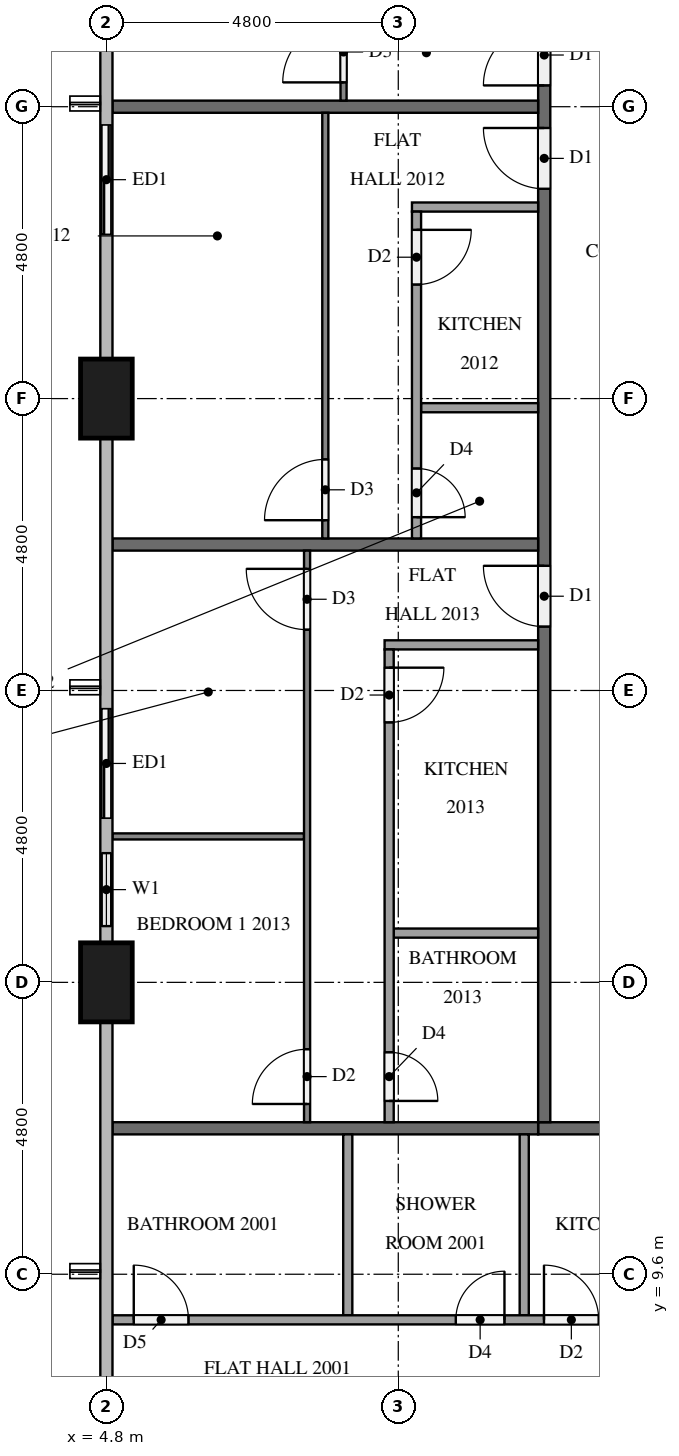
"""IFC4 building model, lengths in metres.
Left out: names, types, materials, properties, quantities, classifications, styles, units other than length and angle.
Written with IfcOpenShell. Run it as: python <this file> out.ifc"""

import sys

from ifc_helpers import new_model, si_unit, direction, frame, frame_2d, origin, origin_2d, place, context, subcontext, project, spatial, rectangle, extrude, element, fill, save


model = new_model("IFC4")
c1 = context("Model", 3, precision=1e-05, world=origin(), true_north=direction((0.0, 1.0)))
c2 = subcontext(c1, "Body", "Model", "MODEL_VIEW")
j1 = project(units=[si_unit("LENGTHUNIT", "METRE"), si_unit("PLANEANGLEUNIT", "RADIAN")], contexts=[c1])
p1 = place(None, origin())
s1 = spatial("IfcSite", under=j1, at=p1, CompositionType="ELEMENT")
p2 = place(p1, origin())
s2 = spatial("IfcBuilding", under=s1, at=p2, CompositionType="ELEMENT")
p3 = place(p2, frame((0.0, 0.0, 80.3)))
s3 = spatial("IfcBuildingStorey", under=s2, at=p3, CompositionType="ELEMENT", Elevation=80.3)
for number, where, z_axis, x_axis in (
    (1, (4.8, 24.0, 0.0), (0.0, 0.0, 1.0), (0.0, 1.0, 0.0)),
    (2, (4.8, 14.4, 0.0), (0.0, 0.0, 1.0), (0.0, 1.0, 0.0)),
):
    element("IfcColumn", number, at=place(p3, frame(where, z_axis=z_axis, x_axis=x_axis)), inside=s3, PredefinedType="COLUMN", context=c2, shape_type="SweptSolid", body=[
        extrude(rectangle(XDim=1.3, YDim=0.85, at=origin_2d()), origin(), (0.0, 0.0, 1.0), 3.1),
    ])
p4 = place(p3, frame((4.8, 28.8, 0.0), z_axis=(0.0, 0.0, 1.0), x_axis=(0.0, -1.0, 0.0)))
e3 = element("IfcWall", 3, at=p4, inside=s3, PredefinedType="SOLIDWALL", context=c2, shape_type="SweptSolid", body=[
    extrude(rectangle(XDim=2.4, YDim=0.15, at=frame_2d((1.2, 0.0))), origin(), (0.0, 0.0, 1.0), 3.1),
])
p5 = place(p4, frame((0.3, 0.0, 0.0)))
e4 = element("IfcOpeningElement", 4, at=p5, cuts=e3, PredefinedType="OPENING", context=c2, shape_type="SweptSolid", body=[
    extrude(rectangle(XDim=1.8, YDim=2.4, at=frame_2d((0.9, 1.2))), frame((0.0, 0.085, 0.0), z_axis=(0.0, -1.0, 0.0), x_axis=(1.0, 0.0, 0.0)), (0.0, 0.0, 1.0), 0.17),
])
p6 = place(p3, frame((4.8, 19.2, 0.0), z_axis=(0.0, 0.0, 1.0), x_axis=(0.0, -1.0, 0.0)))
e5 = element("IfcWall", 5, at=p6, inside=s3, PredefinedType="SOLIDWALL", context=c2, shape_type="SweptSolid", body=[
    extrude(rectangle(XDim=4.15, YDim=0.15, at=frame_2d((2.075, 0.0))), origin(), (0.0, 0.0, 1.0), 3.1),
])
p7 = place(p6, frame((0.3, 0.0, 0.0)))
e6 = element("IfcOpeningElement", 6, at=p7, cuts=e5, PredefinedType="OPENING", context=c2, shape_type="SweptSolid", body=[
    extrude(rectangle(XDim=1.8, YDim=2.4, at=frame_2d((0.9, 1.2))), frame((0.0, 0.085, 0.0), z_axis=(0.0, -1.0, 0.0), x_axis=(1.0, 0.0, 0.0)), (0.0, 0.0, 1.0), 0.17),
])
p8 = place(p6, frame((2.675, 0.0, 0.9)))
e7 = element("IfcOpeningElement", 7, at=p8, cuts=e5, PredefinedType="OPENING", context=c2, shape_type="SweptSolid", body=[
    extrude(rectangle(XDim=1.2, YDim=1.4, at=frame_2d((0.6, 0.7))), frame((0.0, 0.085, 0.0), z_axis=(0.0, -1.0, 0.0), x_axis=(1.0, 0.0, 0.0)), (0.0, 0.0, 1.0), 0.17),
])
p9 = place(p3, frame((50.5, 12.0, 0.0), z_axis=(0.0, 0.0, 1.0), x_axis=(-1.0, 0.0, 0.0)))
e8 = element("IfcWall", 8, at=p9, inside=s3, PredefinedType="PARTITIONING", context=c2, shape_type="SweptSolid", body=[
    extrude(rectangle(XDim=38.6, YDim=0.2, at=frame_2d((19.3, 0.0))), origin(), (0.0, 0.0, 1.0), 3.1),
])
p10 = place(p9, frame((31.65, 0.0, 0.0)))
e9 = element("IfcOpeningElement", 9, at=p10, cuts=e8, PredefinedType="OPENING", context=c2, shape_type="SweptSolid", body=[
    extrude(rectangle(XDim=1.0, YDim=2.1, at=frame_2d((0.5, 1.05))), frame((0.0, 0.11, 0.0), z_axis=(0.0, -1.0, 0.0), x_axis=(1.0, 0.0, 0.0)), (0.0, 0.0, 1.0), 0.22),
])
p11 = place(p9, frame((14.85, 0.0, 0.0)))
e10 = element("IfcOpeningElement", 10, at=p11, cuts=e8, PredefinedType="OPENING", context=c2, shape_type="SweptSolid", body=[
    extrude(rectangle(XDim=1.0, YDim=2.1, at=frame_2d((0.5, 1.05))), frame((0.0, 0.11, 0.0), z_axis=(0.0, -1.0, 0.0), x_axis=(1.0, 0.0, 0.0)), (0.0, 0.0, 1.0), 0.22),
])
p12 = place(p9, frame((13.15, 0.0, 0.0)))
e11 = element("IfcOpeningElement", 11, at=p12, cuts=e8, PredefinedType="OPENING", context=c2, shape_type="SweptSolid", body=[
    extrude(rectangle(XDim=1.0, YDim=2.1, at=frame_2d((0.5, 1.05))), frame((0.0, 0.11, 0.0), z_axis=(0.0, -1.0, 0.0), x_axis=(1.0, 0.0, 0.0)), (0.0, 0.0, 1.0), 0.22),
])
p13 = place(p3, frame((12.0, 12.1, 0.0), z_axis=(0.0, 0.0, 1.0), x_axis=(0.0, 1.0, 0.0)))
e12 = element("IfcWall", 12, at=p13, inside=s3, PredefinedType="PARTITIONING", context=c2, shape_type="SweptSolid", body=[
    extrude(rectangle(XDim=28.6, YDim=0.2, at=frame_2d((14.3, 0.0))), origin(), (0.0, 0.0, 1.0), 3.1),
])
p14 = place(p13, frame((17.05, 0.0, 0.0)))
e13 = element("IfcOpeningElement", 13, at=p14, cuts=e12, PredefinedType="OPENING", context=c2, shape_type="SweptSolid", body=[
    extrude(rectangle(XDim=1.0, YDim=2.1, at=frame_2d((0.5, 1.05))), frame((0.0, 0.11, 0.0), z_axis=(0.0, -1.0, 0.0), x_axis=(1.0, 0.0, 0.0)), (0.0, 0.0, 1.0), 0.22),
])
p15 = place(p13, frame((15.35, 0.0, 0.0)))
e14 = element("IfcOpeningElement", 14, at=p15, cuts=e12, PredefinedType="OPENING", context=c2, shape_type="SweptSolid", body=[
    extrude(rectangle(XDim=1.0, YDim=2.1, at=frame_2d((0.5, 1.05))), frame((0.0, 0.11, 0.0), z_axis=(0.0, -1.0, 0.0), x_axis=(1.0, 0.0, 0.0)), (0.0, 0.0, 1.0), 0.22),
])
p16 = place(p13, frame((8.15, 0.0, 0.0)))
e15 = element("IfcOpeningElement", 15, at=p16, cuts=e12, PredefinedType="OPENING", context=c2, shape_type="SweptSolid", body=[
    extrude(rectangle(XDim=1.0, YDim=2.1, at=frame_2d((0.5, 1.05))), frame((0.0, 0.11, 0.0), z_axis=(0.0, -1.0, 0.0), x_axis=(1.0, 0.0, 0.0)), (0.0, 0.0, 1.0), 0.22),
])
for number, where, z_axis, x_axis in (
    (16, (4.9, 12.0, 0.0), (0.0, 0.0, 1.0), (1.0, 0.0, 0.0)),
    (17, (4.9, 28.8, 0.0), (0.0, 0.0, 1.0), (1.0, 0.0, 0.0)),
    (18, (4.9, 21.6, 0.0), (0.0, 0.0, 1.0), (1.0, 0.0, 0.0)),
):
    element("IfcWall", number, at=place(p3, frame(where, z_axis=z_axis, x_axis=x_axis)), inside=s3, PredefinedType="PARTITIONING", context=c2, shape_type="SweptSolid", body=[
        extrude(rectangle(XDim=7.0, YDim=0.2, at=frame_2d((3.5, 0.0))), origin(), (0.0, 0.0, 1.0), 3.1),
    ])
for number, where, z_axis, x_axis in (
    (19, (11.671, 11.9, 0.0), (0.0, 0.0, 1.0), (0.0, -1.0, 0.0)),
    (20, (8.769, 11.9, 0.0), (0.0, 0.0, 1.0), (0.0, -1.0, 0.0)),
):
    element("IfcWall", number, at=place(p3, frame(where, z_axis=z_axis, x_axis=x_axis)), inside=s3, PredefinedType="PARTITIONING", context=c2, shape_type="SweptSolid", body=[
        extrude(rectangle(XDim=2.975, YDim=0.15, at=frame_2d((1.487, 0.0))), origin(), (0.0, 0.0, 1.0), 3.1),
    ])
p17 = place(p3, frame((4.9, 8.85, 0.0), z_axis=(0.0, 0.0, 1.0), x_axis=(1.0, 0.0, 0.0)))
e21 = element("IfcWall", 21, at=p17, inside=s3, PredefinedType="PARTITIONING", context=c2, shape_type="SweptSolid", body=[
    extrude(rectangle(XDim=12.575, YDim=0.15, at=frame_2d((6.288, 0.0))), origin(), (0.0, 0.0, 1.0), 3.1),
])
p18 = place(p17, frame((7.096, 0.0, 0.0)))
e22 = element("IfcOpeningElement", 22, at=p18, cuts=e21, PredefinedType="OPENING", context=c2, shape_type="SweptSolid", body=[
    extrude(rectangle(XDim=0.9, YDim=2.1, at=frame_2d((0.45, 1.05))), frame((0.0, 0.085, 0.0), z_axis=(0.0, -1.0, 0.0), x_axis=(1.0, 0.0, 0.0)), (0.0, 0.0, 1.0), 0.17),
])
p19 = place(p17, frame((5.646, 0.0, 0.0)))
e23 = element("IfcOpeningElement", 23, at=p19, cuts=e21, PredefinedType="OPENING", context=c2, shape_type="SweptSolid", body=[
    extrude(rectangle(XDim=0.8, YDim=2.1, at=frame_2d((0.4, 1.05))), frame((0.0, 0.085, 0.0), z_axis=(0.0, -1.0, 0.0), x_axis=(1.0, 0.0, 0.0)), (0.0, 0.0, 1.0), 0.17),
])
p20 = place(p17, frame((0.35, 0.0, 0.0)))
e24 = element("IfcOpeningElement", 24, at=p20, cuts=e21, PredefinedType="OPENING", context=c2, shape_type="SweptSolid", body=[
    extrude(rectangle(XDim=0.9, YDim=2.1, at=frame_2d((0.45, 1.05))), frame((0.0, 0.085, 0.0), z_axis=(0.0, -1.0, 0.0), x_axis=(1.0, 0.0, 0.0)), (0.0, 0.0, 1.0), 0.17),
])
p21 = place(p3, frame((8.7, 28.9, 0.0), z_axis=(0.0, 0.0, 1.0), x_axis=(0.0, 1.0, 0.0)))
e25 = element("IfcWall", 25, at=p21, inside=s3, PredefinedType="PARTITIONING", context=c2, shape_type="SweptSolid", body=[
    extrude(rectangle(XDim=11.8, YDim=0.1, at=frame_2d((5.9, 0.0))), origin(), (0.0, 0.0, 1.0), 3.1),
])
p22 = place(p21, frame((0.3, 0.0, 0.0)))
e26 = element("IfcOpeningElement", 26, at=p22, cuts=e25, PredefinedType="OPENING", context=c2, shape_type="SweptSolid", body=[
    extrude(rectangle(XDim=1.0, YDim=2.1, at=frame_2d((0.5, 1.05))), frame((0.0, 0.06, 0.0), z_axis=(0.0, -1.0, 0.0), x_axis=(1.0, 0.0, 0.0)), (0.0, 0.0, 1.0), 0.12),
])
p23 = place(p21, frame((10.6, 0.0, 0.0)))
e27 = element("IfcOpeningElement", 27, at=p23, cuts=e25, PredefinedType="OPENING", context=c2, shape_type="SweptSolid", body=[
    extrude(rectangle(XDim=0.9, YDim=2.1, at=frame_2d((0.45, 1.05))), frame((0.0, 0.06, 0.0), z_axis=(0.0, -1.0, 0.0), x_axis=(1.0, 0.0, 0.0)), (0.0, 0.0, 1.0), 0.12),
])
p24 = place(p3, frame((8.4, 21.7, 0.0), z_axis=(0.0, 0.0, 1.0), x_axis=(0.0, 1.0, 0.0)))
e28 = element("IfcWall", 28, at=p24, inside=s3, PredefinedType="PARTITIONING", context=c2, shape_type="SweptSolid", body=[
    extrude(rectangle(XDim=7.0, YDim=0.1, at=frame_2d((3.5, 0.0))), origin(), (0.0, 0.0, 1.0), 3.1),
])
p25 = place(p24, frame((0.3, 0.0, 0.0)))
e29 = element("IfcOpeningElement", 29, at=p25, cuts=e28, PredefinedType="OPENING", context=c2, shape_type="SweptSolid", body=[
    extrude(rectangle(XDim=1.0, YDim=2.1, at=frame_2d((0.5, 1.05))), frame((0.0, 0.06, 0.0), z_axis=(0.0, -1.0, 0.0), x_axis=(1.0, 0.0, 0.0)), (0.0, 0.0, 1.0), 0.12),
])
p26 = place(p3, frame((11.9, 23.85, 0.0), z_axis=(0.0, 0.0, 1.0), x_axis=(-1.0, 0.0, 0.0)))
e30 = element("IfcWall", 30, at=p26, inside=s3, PredefinedType="PARTITIONING", context=c2, shape_type="SweptSolid", body=[
    extrude(rectangle(XDim=1.925, YDim=0.15, at=frame_2d((0.962, 0.0))), origin(), (0.0, 0.0, 1.0), 3.1),
])
p27 = place(p3, frame((11.9, 27.15, 0.0), z_axis=(0.0, 0.0, 1.0), x_axis=(-1.0, 0.0, 0.0)))
e31 = element("IfcWall", 31, at=p27, inside=s3, PredefinedType="PARTITIONING", context=c2, shape_type="SweptSolid", body=[
    extrude(rectangle(XDim=2.075, YDim=0.15, at=frame_2d((1.038, 0.0))), origin(), (0.0, 0.0, 1.0), 3.1),
])
p28 = place(p3, frame((9.9, 27.075, 0.0), z_axis=(0.0, 0.0, 1.0), x_axis=(0.0, -1.0, 0.0)))
e32 = element("IfcWall", 32, at=p28, inside=s3, PredefinedType="PARTITIONING", context=c2, shape_type="SweptSolid", body=[
    extrude(rectangle(XDim=5.375, YDim=0.15, at=frame_2d((2.688, 0.0))), origin(), (0.0, 0.0, 1.0), 3.1),
])
p29 = place(p28, frame((0.3, 0.0, 0.0)))
e33 = element("IfcOpeningElement", 33, at=p29, cuts=e32, PredefinedType="OPENING", context=c2, shape_type="SweptSolid", body=[
    extrude(rectangle(XDim=0.9, YDim=2.1, at=frame_2d((0.45, 1.05))), frame((0.0, 0.085, 0.0), z_axis=(0.0, -1.0, 0.0), x_axis=(1.0, 0.0, 0.0)), (0.0, 0.0, 1.0), 0.17),
])
p30 = place(p28, frame((4.225, 0.0, 0.0)))
e34 = element("IfcOpeningElement", 34, at=p30, cuts=e32, PredefinedType="OPENING", context=c2, shape_type="SweptSolid", body=[
    extrude(rectangle(XDim=0.8, YDim=2.1, at=frame_2d((0.4, 1.05))), frame((0.0, 0.085, 0.0), z_axis=(0.0, -1.0, 0.0), x_axis=(1.0, 0.0, 0.0)), (0.0, 0.0, 1.0), 0.17),
])
p31 = place(p3, frame((8.05, 16.8, 0.0), z_axis=(0.0, 0.0, 1.0), x_axis=(-1.0, 0.0, 0.0)))
e35 = element("IfcWall", 35, at=p31, inside=s3, PredefinedType="PARTITIONING", context=c2, shape_type="SweptSolid", body=[
    extrude(rectangle(XDim=3.15, YDim=0.1, at=frame_2d((1.575, 0.0))), origin(), (0.0, 0.0, 1.0), 3.1),
])
p32 = place(p3, frame((8.1, 12.1, 0.0), z_axis=(0.0, 0.0, 1.0), x_axis=(0.0, 1.0, 0.0)))
e36 = element("IfcWall", 36, at=p32, inside=s3, PredefinedType="PARTITIONING", context=c2, shape_type="SweptSolid", body=[
    extrude(rectangle(XDim=9.4, YDim=0.1, at=frame_2d((4.7, 0.0))), origin(), (0.0, 0.0, 1.0), 3.1),
])
p33 = place(p32, frame((8.1, 0.0, 0.0)))
e37 = element("IfcOpeningElement", 37, at=p33, cuts=e36, PredefinedType="OPENING", context=c2, shape_type="SweptSolid", body=[
    extrude(rectangle(XDim=1.0, YDim=2.1, at=frame_2d((0.5, 1.05))), frame((0.0, 0.06, 0.0), z_axis=(0.0, -1.0, 0.0), x_axis=(1.0, 0.0, 0.0)), (0.0, 0.0, 1.0), 0.12),
])
p34 = place(p32, frame((0.3, 0.0, 0.0)))
e38 = element("IfcOpeningElement", 38, at=p34, cuts=e36, PredefinedType="OPENING", context=c2, shape_type="SweptSolid", body=[
    extrude(rectangle(XDim=0.9, YDim=2.1, at=frame_2d((0.45, 1.05))), frame((0.0, 0.06, 0.0), z_axis=(0.0, -1.0, 0.0), x_axis=(1.0, 0.0, 0.0)), (0.0, 0.0, 1.0), 0.12),
])
p35 = place(p3, frame((11.9, 15.21, 0.0), z_axis=(0.0, 0.0, 1.0), x_axis=(-1.0, 0.0, 0.0)))
e39 = element("IfcWall", 39, at=p35, inside=s3, PredefinedType="PARTITIONING", context=c2, shape_type="SweptSolid", body=[
    extrude(rectangle(XDim=2.375, YDim=0.15, at=frame_2d((1.188, 0.0))), origin(), (0.0, 0.0, 1.0), 3.1),
])
p36 = place(p3, frame((11.9, 19.95, 0.0), z_axis=(0.0, 0.0, 1.0), x_axis=(-1.0, 0.0, 0.0)))
e40 = element("IfcWall", 40, at=p36, inside=s3, PredefinedType="PARTITIONING", context=c2, shape_type="SweptSolid", body=[
    extrude(rectangle(XDim=2.525, YDim=0.15, at=frame_2d((1.262, 0.0))), origin(), (0.0, 0.0, 1.0), 3.1),
])
p37 = place(p3, frame((9.45, 19.875, 0.0), z_axis=(0.0, 0.0, 1.0), x_axis=(0.0, -1.0, 0.0)))
e41 = element("IfcWall", 41, at=p37, inside=s3, PredefinedType="PARTITIONING", context=c2, shape_type="SweptSolid", body=[
    extrude(rectangle(XDim=7.775, YDim=0.15, at=frame_2d((3.887, 0.0))), origin(), (0.0, 0.0, 1.0), 3.1),
])
p38 = place(p37, frame((0.3, 0.0, 0.0)))
e42 = element("IfcOpeningElement", 42, at=p38, cuts=e41, PredefinedType="OPENING", context=c2, shape_type="SweptSolid", body=[
    extrude(rectangle(XDim=0.9, YDim=2.1, at=frame_2d((0.45, 1.05))), frame((0.0, 0.085, 0.0), z_axis=(0.0, -1.0, 0.0), x_axis=(1.0, 0.0, 0.0)), (0.0, 0.0, 1.0), 0.17),
])
p39 = place(p37, frame((6.625, 0.0, 0.0)))
e43 = element("IfcOpeningElement", 43, at=p39, cuts=e41, PredefinedType="OPENING", context=c2, shape_type="SweptSolid", body=[
    extrude(rectangle(XDim=0.8, YDim=2.1, at=frame_2d((0.4, 1.05))), frame((0.0, 0.085, 0.0), z_axis=(0.0, -1.0, 0.0), x_axis=(1.0, 0.0, 0.0)), (0.0, 0.0, 1.0), 0.17),
])
p40 = place(p5, origin())
e44 = element("IfcDoor", 44, at=p40, inside=s3, OperationType="SLIDING_TO_LEFT", PredefinedType="DOOR", context=c2, shape_type="SweptSolid", body=[
    extrude(rectangle(XDim=1.8, YDim=2.4, at=frame_2d((0.9, 1.2))), frame((0.0, 0.025, 0.0), z_axis=(0.0, -1.0, 0.0), x_axis=(1.0, 0.0, 0.0)), (0.0, 0.0, 1.0), 0.05),
])
fill(e4, e44)
p41 = place(p7, origin())
e45 = element("IfcDoor", 45, at=p41, inside=s3, OperationType="SLIDING_TO_RIGHT", PredefinedType="DOOR", context=c2, shape_type="SweptSolid", body=[
    extrude(rectangle(XDim=1.8, YDim=2.4, at=frame_2d((0.9, 1.2))), frame((0.0, 0.025, 0.0), z_axis=(0.0, -1.0, 0.0), x_axis=(1.0, 0.0, 0.0)), (0.0, 0.0, 1.0), 0.05),
])
fill(e6, e45)
p42 = place(p8, origin())
e46 = element("IfcWindow", 46, at=p42, inside=s3, PartitioningType="SINGLE_PANEL", PredefinedType="WINDOW", context=c2, shape_type="SweptSolid", body=[
    extrude(rectangle(XDim=1.2, YDim=1.4, at=frame_2d((0.6, 0.7))), frame((0.0, 0.03, 0.0), z_axis=(0.0, -1.0, 0.0), x_axis=(1.0, 0.0, 0.0)), (0.0, 0.0, 1.0), 0.06),
])
fill(e7, e46)
p43 = place(p14, origin())
e47 = element("IfcDoor", 47, at=p43, inside=s3, OperationType="SINGLE_SWING_LEFT", PredefinedType="DOOR", context=c2, shape_type="SweptSolid", body=[
    extrude(rectangle(XDim=1.0, YDim=2.1, at=frame_2d((0.5, 1.05))), frame((0.0, 0.025, 0.0), z_axis=(0.0, -1.0, 0.0), x_axis=(1.0, 0.0, 0.0)), (0.0, 0.0, 1.0), 0.05),
])
fill(e13, e47)
p44 = place(p15, origin())
e48 = element("IfcDoor", 48, at=p44, inside=s3, OperationType="SINGLE_SWING_RIGHT", PredefinedType="DOOR", context=c2, shape_type="SweptSolid", body=[
    extrude(rectangle(XDim=1.0, YDim=2.1, at=frame_2d((0.5, 1.05))), frame((0.0, 0.025, 0.0), z_axis=(0.0, -1.0, 0.0), x_axis=(1.0, 0.0, 0.0)), (0.0, 0.0, 1.0), 0.05),
])
fill(e14, e48)
p45 = place(p16, origin())
e49 = element("IfcDoor", 49, at=p45, inside=s3, OperationType="SINGLE_SWING_RIGHT", PredefinedType="DOOR", context=c2, shape_type="SweptSolid", body=[
    extrude(rectangle(XDim=1.0, YDim=2.1, at=frame_2d((0.5, 1.05))), frame((0.0, 0.025, 0.0), z_axis=(0.0, -1.0, 0.0), x_axis=(1.0, 0.0, 0.0)), (0.0, 0.0, 1.0), 0.05),
])
fill(e15, e49)
p46 = place(p18, origin())
e50 = element("IfcDoor", 50, at=p46, inside=s3, OperationType="SINGLE_SWING_LEFT", PredefinedType="DOOR", context=c2, shape_type="SweptSolid", body=[
    extrude(rectangle(XDim=0.9, YDim=2.1, at=frame_2d((0.45, 1.05))), frame((0.0, 0.025, 0.0), z_axis=(0.0, -1.0, 0.0), x_axis=(1.0, 0.0, 0.0)), (0.0, 0.0, 1.0), 0.05),
])
fill(e22, e50)
p47 = place(p19, origin())
e51 = element("IfcDoor", 51, at=p47, inside=s3, OperationType="SINGLE_SWING_RIGHT", PredefinedType="DOOR", context=c2, shape_type="SweptSolid", body=[
    extrude(rectangle(XDim=0.8, YDim=2.1, at=frame_2d((0.4, 1.05))), frame((0.0, 0.025, 0.0), z_axis=(0.0, -1.0, 0.0), x_axis=(1.0, 0.0, 0.0)), (0.0, 0.0, 1.0), 0.05),
])
fill(e23, e51)
p48 = place(p20, origin())
e52 = element("IfcDoor", 52, at=p48, inside=s3, OperationType="SINGLE_SWING_LEFT", PredefinedType="DOOR", context=c2, shape_type="SweptSolid", body=[
    extrude(rectangle(XDim=0.9, YDim=2.1, at=frame_2d((0.45, 1.05))), frame((0.0, 0.025, 0.0), z_axis=(0.0, -1.0, 0.0), x_axis=(1.0, 0.0, 0.0)), (0.0, 0.0, 1.0), 0.05),
])
fill(e24, e52)
p49 = place(p22, origin())
e53 = element("IfcDoor", 53, at=p49, inside=s3, OperationType="SINGLE_SWING_LEFT", PredefinedType="DOOR", context=c2, shape_type="SweptSolid", body=[
    extrude(rectangle(XDim=1.0, YDim=2.1, at=frame_2d((0.5, 1.05))), frame((0.0, 0.025, 0.0), z_axis=(0.0, -1.0, 0.0), x_axis=(1.0, 0.0, 0.0)), (0.0, 0.0, 1.0), 0.05),
])
fill(e26, e53)
p50 = place(p25, origin())
e54 = element("IfcDoor", 54, at=p50, inside=s3, OperationType="SINGLE_SWING_LEFT", PredefinedType="DOOR", context=c2, shape_type="SweptSolid", body=[
    extrude(rectangle(XDim=1.0, YDim=2.1, at=frame_2d((0.5, 1.05))), frame((0.0, 0.025, 0.0), z_axis=(0.0, -1.0, 0.0), x_axis=(1.0, 0.0, 0.0)), (0.0, 0.0, 1.0), 0.05),
])
fill(e29, e54)
p51 = place(p29, origin())
e55 = element("IfcDoor", 55, at=p51, inside=s3, OperationType="SINGLE_SWING_LEFT", PredefinedType="DOOR", context=c2, shape_type="SweptSolid", body=[
    extrude(rectangle(XDim=0.9, YDim=2.1, at=frame_2d((0.45, 1.05))), frame((0.0, 0.025, 0.0), z_axis=(0.0, -1.0, 0.0), x_axis=(1.0, 0.0, 0.0)), (0.0, 0.0, 1.0), 0.05),
])
fill(e33, e55)
p52 = place(p30, origin())
e56 = element("IfcDoor", 56, at=p52, inside=s3, OperationType="SINGLE_SWING_RIGHT", PredefinedType="DOOR", context=c2, shape_type="SweptSolid", body=[
    extrude(rectangle(XDim=0.8, YDim=2.1, at=frame_2d((0.4, 1.05))), frame((0.0, 0.025, 0.0), z_axis=(0.0, -1.0, 0.0), x_axis=(1.0, 0.0, 0.0)), (0.0, 0.0, 1.0), 0.05),
])
fill(e34, e56)
p53 = place(p33, origin())
e57 = element("IfcDoor", 57, at=p53, inside=s3, OperationType="SINGLE_SWING_RIGHT", PredefinedType="DOOR", context=c2, shape_type="SweptSolid", body=[
    extrude(rectangle(XDim=1.0, YDim=2.1, at=frame_2d((0.5, 1.05))), frame((0.0, 0.025, 0.0), z_axis=(0.0, -1.0, 0.0), x_axis=(1.0, 0.0, 0.0)), (0.0, 0.0, 1.0), 0.05),
])
fill(e37, e57)
p54 = place(p34, origin())
e58 = element("IfcDoor", 58, at=p54, inside=s3, OperationType="SINGLE_SWING_LEFT", PredefinedType="DOOR", context=c2, shape_type="SweptSolid", body=[
    extrude(rectangle(XDim=0.9, YDim=2.1, at=frame_2d((0.45, 1.05))), frame((0.0, 0.025, 0.0), z_axis=(0.0, -1.0, 0.0), x_axis=(1.0, 0.0, 0.0)), (0.0, 0.0, 1.0), 0.05),
])
fill(e38, e58)
p55 = place(p38, origin())
e59 = element("IfcDoor", 59, at=p55, inside=s3, OperationType="SINGLE_SWING_LEFT", PredefinedType="DOOR", context=c2, shape_type="SweptSolid", body=[
    extrude(rectangle(XDim=0.9, YDim=2.1, at=frame_2d((0.45, 1.05))), frame((0.0, 0.025, 0.0), z_axis=(0.0, -1.0, 0.0), x_axis=(1.0, 0.0, 0.0)), (0.0, 0.0, 1.0), 0.05),
])
fill(e42, e59)
p56 = place(p39, origin())
e60 = element("IfcDoor", 60, at=p56, inside=s3, OperationType="SINGLE_SWING_RIGHT", PredefinedType="DOOR", context=c2, shape_type="SweptSolid", body=[
    extrude(rectangle(XDim=0.8, YDim=2.1, at=frame_2d((0.4, 1.05))), frame((0.0, 0.025, 0.0), z_axis=(0.0, -1.0, 0.0), x_axis=(1.0, 0.0, 0.0)), (0.0, 0.0, 1.0), 0.05),
])
fill(e43, e60)
save(model, sys.argv[1])
